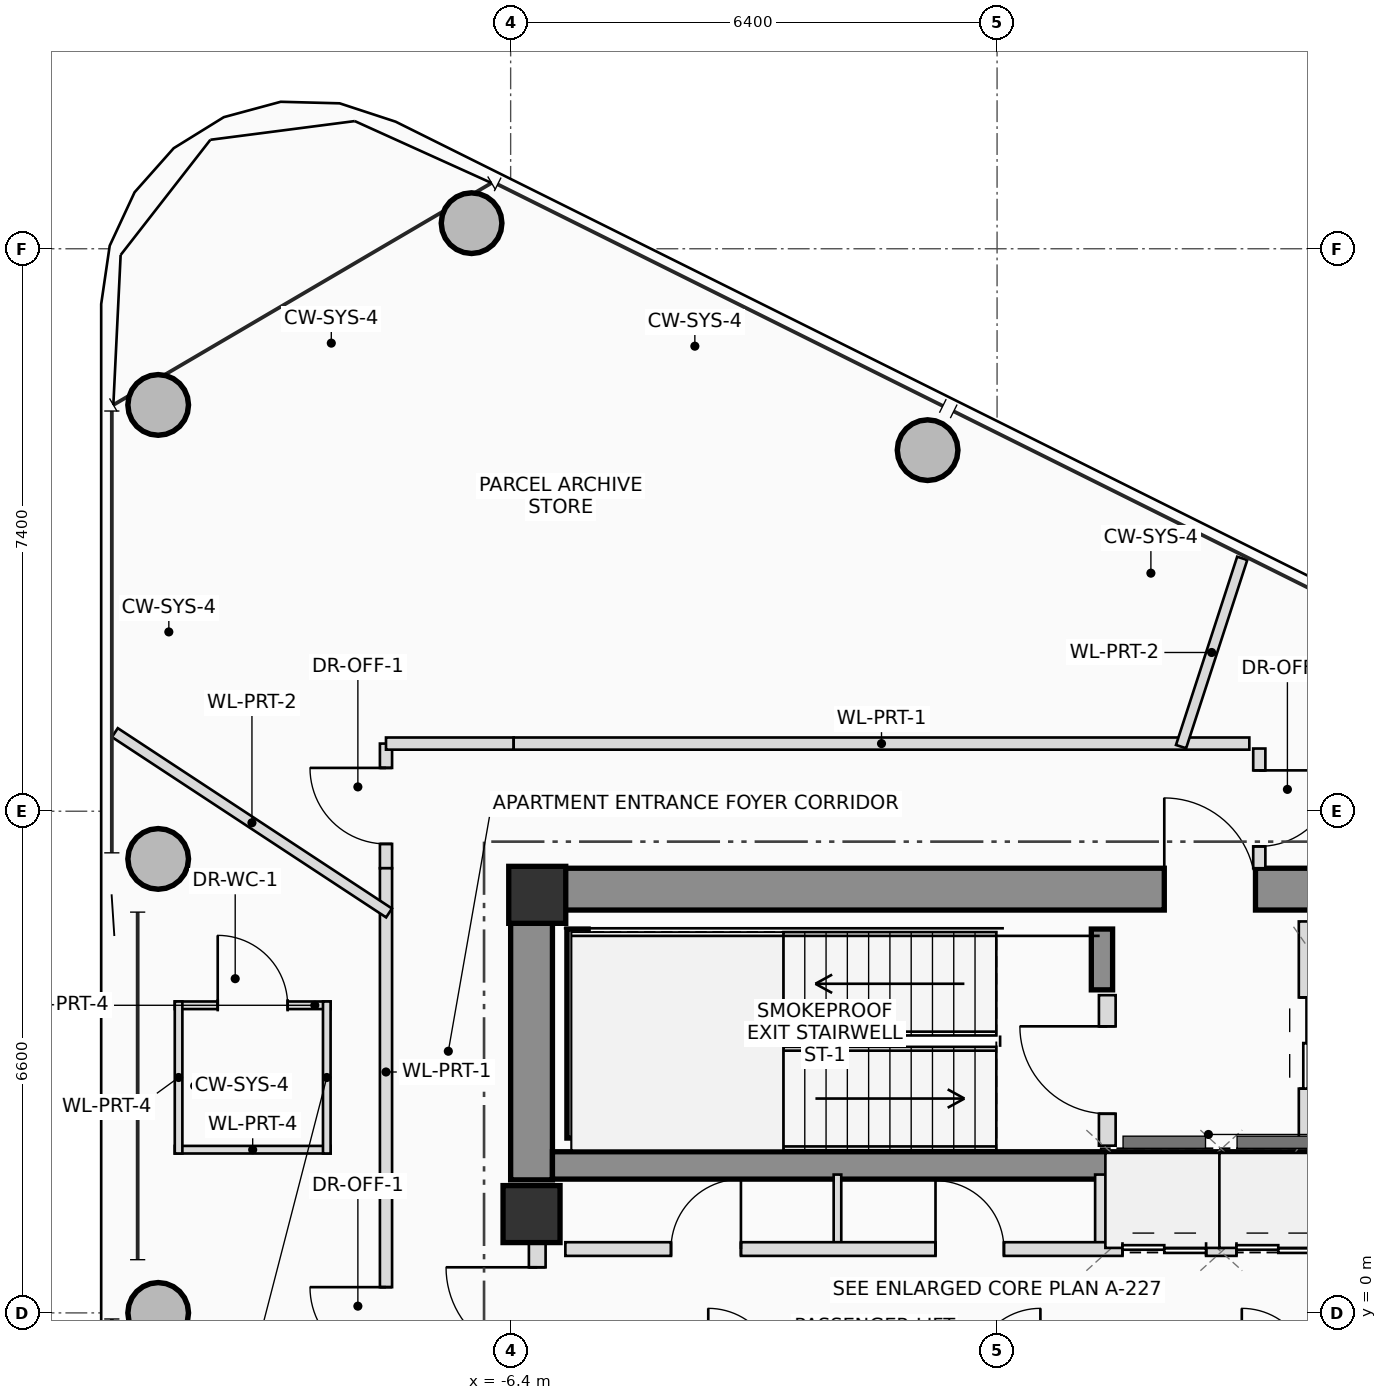
"""IFC4 building model, lengths in metres.
Left out: names, types, materials, properties, quantities, classifications, styles, units other than length and angle.
Written with IfcOpenShell. Run it as: python <this file> out.ifc"""

import sys

from ifc_helpers import new_model, si_unit, direction, frame, frame_2d, origin, origin_2d, place, context, subcontext, project, spatial, rectangle, hollow_circle, extrude, source, transform, mapped, element, fill, save


model = new_model("IFC4")
c1 = context("Model", 3, precision=1e-05, world=origin(), true_north=direction((0.0, 1.0)))
c2 = subcontext(c1, "Body", "Model", "MODEL_VIEW")
j1 = project(units=[si_unit("LENGTHUNIT", "METRE"), si_unit("PLANEANGLEUNIT", "RADIAN")], contexts=[c1])
p1 = place(None, origin())
s1 = spatial("IfcSite", under=j1, at=p1, CompositionType="ELEMENT")
p2 = place(p1, origin())
s2 = spatial("IfcBuilding", under=s1, at=p2, CompositionType="ELEMENT")
p3 = place(p2, frame((0.0, 0.0, 296.75)))
s3 = spatial("IfcBuildingStorey", under=s2, at=p3, CompositionType="ELEMENT", Elevation=296.75)
m1 = source(origin(), c2, "Body", "SweptSolid", [
    extrude(rectangle(XDim=0.75, YDim=0.75, at=origin_2d()), origin(), (0.0, 0.0, 1.0), 3.45),
])
p4 = place(p3, frame((-6.05, 5.5, 0.0), z_axis=(0.0, 0.0, 1.0), x_axis=(1.0, 0.0, 0.0)))
e1 = element("IfcColumn", 1, at=p4, inside=s3, PredefinedType="COLUMN", context=c2, shape_type="MappedRepresentation", body=[
    mapped(m1, transform((0.0, 0.0, 0.0), scale=1.0)),
])
p5 = place(p3, frame((-6.4, 5.575, 0.0), z_axis=(0.0, 0.0, 1.0), x_axis=(1.0, 0.0, 0.0)))
e2 = element("IfcWall", 2, at=p5, inside=s3, PredefinedType="SHEAR", context=c2, shape_type="SweptSolid", body=[
    extrude(rectangle(XDim=12.8, YDim=0.55, at=frame_2d((6.4, 0.0))), origin(), (0.0, 0.0, 1.0), 3.45),
])
p6 = place(p5, frame((8.6, 0.0, 0.0)))
e3 = element("IfcOpeningElement", 3, at=p6, cuts=e2, PredefinedType="OPENING", context=c2, shape_type="SweptSolid", body=[
    extrude(rectangle(XDim=1.2, YDim=2.2, at=frame_2d((0.6, 1.1))), frame((0.0, 0.285, 0.0), z_axis=(0.0, -1.0, 0.0), x_axis=(1.0, 0.0, 0.0)), (0.0, 0.0, 1.0), 0.57),
])
p7 = place(p3, frame((-6.125, 1.75, 0.0), z_axis=(0.0, 0.0, 1.0), x_axis=(0.0, 1.0, 0.0)))
e4 = element("IfcWall", 4, at=p7, inside=s3, PredefinedType="SHEAR", context=c2, shape_type="SweptSolid", body=[
    extrude(rectangle(XDim=3.55, YDim=0.55, at=frame_2d((1.775, 0.0))), origin(), (0.0, 0.0, 1.0), 3.45),
])
p8 = place(p3, frame((-5.85, 1.94, 0.0), z_axis=(0.0, 0.0, 1.0), x_axis=(1.0, 0.0, 0.0)))
e5 = element("IfcWall", 5, at=p8, inside=s3, PredefinedType="SHEAR", context=c2, shape_type="SweptSolid", body=[
    extrude(rectangle(XDim=11.7, YDim=0.36, at=frame_2d((5.85, 0.0))), origin(), (0.0, 0.0, 1.0), 3.45),
])
p9 = place(p3, frame((-5.52, 2.3, 0.0), z_axis=(0.0, 0.0, 1.0), x_axis=(0.0, 1.0, 0.0)))
e6 = element("IfcWall", 6, at=p9, inside=s3, PredefinedType="SHEAR", context=c2, shape_type="SweptSolid", body=[
    extrude(rectangle(XDim=2.75, YDim=0.28, at=frame_2d((1.375, 0.0))), origin(), (0.0, 0.0, 1.0), 3.45),
])
p10 = place(p3, frame((1.38, 4.25, 0.0), z_axis=(0.0, 0.0, 1.0), x_axis=(0.0, 1.0, 0.0)))
e7 = element("IfcWall", 7, at=p10, inside=s3, PredefinedType="SHEAR", context=c2, shape_type="SweptSolid", body=[
    extrude(rectangle(XDim=0.8, YDim=0.28, at=frame_2d((0.4, 0.0))), origin(), (0.0, 0.0, 1.0), 3.45),
])
p11 = place(p3, frame((-6.125, 1.3, 0.0), z_axis=(0.0, 0.0, 1.0), x_axis=(1.0, 0.0, 0.0)))
e8 = element("IfcColumn", 8, at=p11, inside=s3, PredefinedType="COLUMN", context=c2, shape_type="MappedRepresentation", body=[
    mapped(m1, transform((0.0, 0.0, 0.0), scale=1.0)),
])
m2 = source(origin(), c2, "Body", "SweptSolid", [
    extrude(hollow_circle(Radius=0.4, WallThickness=0.028, at=origin_2d()), origin(), (0.0, 0.0, 1.0), 3.45),
])
for number, where, z_axis, x_axis in (
    (9, (-0.914, 11.35, 0.0), (0.0, 0.0, 1.0), (1.0, 0.0, 0.0)),
    (10, (-6.914, 14.337, 0.0), (0.0, 0.0, 1.0), (1.0, 0.0, 0.0)),
    (11, (-11.037, 11.945, 0.0), (0.0, 0.0, 1.0), (1.0, 0.0, 0.0)),
    (12, (-11.037, 5.973, 0.0), (0.0, 0.0, 1.0), (1.0, 0.0, 0.0)),
    (13, (-11.037, 0.0, 0.0), (0.0, 0.0, 1.0), (1.0, 0.0, 0.0)),
):
    element("IfcColumn", number, at=place(p3, frame(where, z_axis=z_axis, x_axis=x_axis)), inside=s3, PredefinedType="COLUMN", context=c2, shape_type="MappedRepresentation", body=[
        mapped(m2, transform((0.0, 0.0, 0.0), scale=1.0)),
    ])
p12 = place(p3, frame((-6.05, -0.95, 0.0), z_axis=(0.0, 0.0, 1.0), x_axis=(0.0, 1.0, 0.0)))
e14 = element("IfcWall", 14, at=p12, inside=s3, PredefinedType="PLUMBINGWALL", context=c2, shape_type="SweptSolid", body=[
    extrude(rectangle(XDim=1.9, YDim=0.22, at=frame_2d((0.95, 0.0))), origin(), (0.0, 0.0, 1.0), 2.23),
])
p13 = place(p12, frame((0.35, 0.0, 0.0)))
e15 = element("IfcOpeningElement", 15, at=p13, cuts=e14, PredefinedType="OPENING", context=c2, shape_type="SweptSolid", body=[
    extrude(rectangle(XDim=1.2, YDim=2.2, at=frame_2d((0.6, 1.1))), frame((0.0, 0.12, 0.0), z_axis=(0.0, -1.0, 0.0), x_axis=(1.0, 0.0, 0.0)), (0.0, 0.0, 1.0), 0.24),
])
p14 = place(p3, frame((1.45, 2.2, 0.0), z_axis=(0.0, 0.0, 1.0), x_axis=(0.0, 1.0, 0.0)))
e16 = element("IfcWall", 16, at=p14, inside=s3, PredefinedType="PLUMBINGWALL", context=c2, shape_type="SweptSolid", body=[
    extrude(rectangle(XDim=1.98, YDim=0.22, at=frame_2d((0.99, 0.0))), origin(), (0.0, 0.0, 1.0), 3.25),
])
p15 = place(p14, frame((0.42, 0.0, 0.0)))
e17 = element("IfcOpeningElement", 17, at=p15, cuts=e16, PredefinedType="OPENING", context=c2, shape_type="SweptSolid", body=[
    extrude(rectangle(XDim=1.15, YDim=2.15, at=frame_2d((0.575, 1.075))), frame((0.0, 0.12, 0.0), z_axis=(0.0, -1.0, 0.0), x_axis=(1.0, 0.0, 0.0)), (0.0, 0.0, 1.0), 0.24),
])
p16 = place(p3, frame((4.08, 2.2, 0.0), z_axis=(0.0, 0.0, 1.0), x_axis=(0.0, 1.0, 0.0)))
e18 = element("IfcWall", 18, at=p16, inside=s3, PredefinedType="PLUMBINGWALL", context=c2, shape_type="SweptSolid", body=[
    extrude(rectangle(XDim=2.95, YDim=0.22, at=frame_2d((1.475, 0.0))), origin(), (0.0, 0.0, 1.0), 3.25),
])
p17 = place(p16, frame((0.75, 0.0, 0.0)))
e19 = element("IfcOpeningElement", 19, at=p17, cuts=e18, PredefinedType="OPENING", context=c2, shape_type="SweptSolid", body=[
    extrude(rectangle(XDim=1.2, YDim=2.25, at=frame_2d((0.6, 1.125))), frame((0.0, 0.12, 0.0), z_axis=(0.0, -1.0, 0.0), x_axis=(1.0, 0.0, 0.0)), (0.0, 0.0, 1.0), 0.24),
])
p18 = place(p3, frame((-2.1, 0.84, 0.0), z_axis=(0.0, 0.0, 1.0), x_axis=(0.0, 1.0, 0.0)))
e20 = element("IfcWall", 20, at=p18, inside=s3, PredefinedType="PARTITIONING", context=c2, shape_type="SweptSolid", body=[
    extrude(rectangle(XDim=0.98, YDim=0.1, at=frame_2d((0.49, 0.0))), origin(), (0.0, 0.0, 1.0), 3.25),
])
for number, where, z_axis, x_axis in (
    (21, (1.38, 0.84, 0.0), (0.0, 0.0, 1.0), (0.0, 1.0, 0.0)),
    (22, (3.02, 0.84, 0.0), (0.0, 0.0, 1.0), (0.0, 1.0, 0.0)),
):
    element("IfcWall", number, at=place(p3, frame(where, z_axis=z_axis, x_axis=x_axis)), inside=s3, PredefinedType="PLUMBINGWALL", context=c2, shape_type="SweptSolid", body=[
        extrude(rectangle(XDim=0.98, YDim=0.18, at=frame_2d((0.49, 0.0))), origin(), (0.0, 0.0, 1.0), 3.25),
    ])
p19 = place(p3, frame((-5.68, 0.84, 0.0), z_axis=(0.0, 0.0, 1.0), x_axis=(1.0, 0.0, 0.0)))
e23 = element("IfcWall", 23, at=p19, inside=s3, PredefinedType="PLUMBINGWALL", context=c2, shape_type="SweptSolid", body=[
    extrude(rectangle(XDim=11.33, YDim=0.18, at=frame_2d((5.665, 0.0))), origin(), (0.0, 0.0, 1.0), 3.25),
])
p20 = place(p19, frame((1.39, 0.0, 0.0)))
e24 = element("IfcOpeningElement", 24, at=p20, cuts=e23, PredefinedType="OPENING", context=c2, shape_type="SweptSolid", body=[
    extrude(rectangle(XDim=0.92, YDim=2.1, at=frame_2d((0.46, 1.05))), frame((0.0, 0.1, 0.0), z_axis=(0.0, -1.0, 0.0), x_axis=(1.0, 0.0, 0.0)), (0.0, 0.0, 1.0), 0.2),
])
p21 = place(p19, frame((4.87, 0.0, 0.0)))
e25 = element("IfcOpeningElement", 25, at=p21, cuts=e23, PredefinedType="OPENING", context=c2, shape_type="SweptSolid", body=[
    extrude(rectangle(XDim=0.9, YDim=2.05, at=frame_2d((0.45, 1.025))), frame((0.0, 0.1, 0.0), z_axis=(0.0, -1.0, 0.0), x_axis=(1.0, 0.0, 0.0)), (0.0, 0.0, 1.0), 0.2),
])
p22 = place(p19, frame((7.33, 0.0, 0.0)))
e26 = element("IfcOpeningElement", 26, at=p22, cuts=e23, PredefinedType="OPENING", context=c2, shape_type="SweptSolid", body=[
    extrude(rectangle(XDim=1.1, YDim=2.2, at=frame_2d((0.55, 1.1))), frame((0.0, 0.1, 0.0), z_axis=(0.0, -1.0, 0.0), x_axis=(1.0, 0.0, 0.0)), (0.0, 0.0, 1.0), 0.2),
])
p23 = place(p19, frame((8.83, 0.0, 0.0)))
e27 = element("IfcOpeningElement", 27, at=p23, cuts=e23, PredefinedType="OPENING", context=c2, shape_type="SweptSolid", body=[
    extrude(rectangle(XDim=1.1, YDim=2.2, at=frame_2d((0.55, 1.1))), frame((0.0, 0.1, 0.0), z_axis=(0.0, -1.0, 0.0), x_axis=(1.0, 0.0, 0.0)), (0.0, 0.0, 1.0), 0.2),
])
p24 = place(p19, frame((10.25, 0.0, 0.0)))
e28 = element("IfcOpeningElement", 28, at=p24, cuts=e23, PredefinedType="OPENING", context=c2, shape_type="SweptSolid", body=[
    extrude(rectangle(XDim=0.9, YDim=2.05, at=frame_2d((0.45, 1.025))), frame((0.0, 0.1, 0.0), z_axis=(0.0, -1.0, 0.0), x_axis=(1.0, 0.0, 0.0)), (0.0, 0.0, 1.0), 0.2),
])
p25 = place(p3, frame((-10.819, 4.047, 0.0), z_axis=(0.0, 0.0, 1.0), x_axis=(1.0, 0.0, 0.0)))
e29 = element("IfcWall", 29, at=p25, inside=s3, PredefinedType="PARTITIONING", context=c2, shape_type="SweptSolid", body=[
    extrude(rectangle(XDim=2.05, YDim=0.1, at=frame_2d((1.025, 0.0))), origin(), (0.0, 0.0, 1.0), 2.905),
])
p26 = place(p25, frame((0.565, 0.0, 0.0)))
e30 = element("IfcOpeningElement", 30, at=p26, cuts=e29, PredefinedType="OPENING", context=c2, shape_type="SweptSolid", body=[
    extrude(rectangle(XDim=0.92, YDim=2.1, at=frame_2d((0.46, 1.05))), frame((0.0, 0.06, 0.0), z_axis=(0.0, -1.0, 0.0), x_axis=(1.0, 0.0, 0.0)), (0.0, 0.0, 1.0), 0.12),
])
p27 = place(p3, frame((-8.769, 2.147, 0.0), z_axis=(0.0, 0.0, 1.0), x_axis=(-1.0, 0.0, 0.0)))
e31 = element("IfcWall", 31, at=p27, inside=s3, PredefinedType="PARTITIONING", context=c2, shape_type="SweptSolid", body=[
    extrude(rectangle(XDim=2.05, YDim=0.1, at=frame_2d((1.025, 0.0))), origin(), (0.0, 0.0, 1.0), 2.905),
])
for number, where, z_axis, x_axis in (
    (32, (-8.819, 4.097, 0.0), (0.0, 0.0, 1.0), (0.0, -1.0, 0.0)),
    (33, (-10.769, 2.097, 0.0), (0.0, 0.0, 1.0), (0.0, 1.0, 0.0)),
):
    element("IfcWall", number, at=place(p3, frame(where, z_axis=z_axis, x_axis=x_axis)), inside=s3, PredefinedType="PARTITIONING", context=c2, shape_type="SweptSolid", body=[
        extrude(rectangle(XDim=2.0, YDim=0.1, at=frame_2d((1.0, 0.0))), origin(), (0.0, 0.0, 1.0), 3.25),
    ])
p28 = place(p3, frame((-8.04, 5.85, 0.0), z_axis=(0.0, 0.0, 1.0), x_axis=(0.0, 1.0, 0.0)))
e34 = element("IfcWall", 34, at=p28, inside=s3, PredefinedType="PARTITIONING", context=c2, shape_type="SweptSolid", body=[
    extrude(rectangle(XDim=1.64, YDim=0.16, at=frame_2d((0.82, 0.0))), origin(), (0.0, 0.0, 1.0), 2.905),
])
p29 = place(p28, frame((0.32, 0.0, 0.0)))
e35 = element("IfcOpeningElement", 35, at=p29, cuts=e34, PredefinedType="OPENING", context=c2, shape_type="SweptSolid", body=[
    extrude(rectangle(XDim=1.0, YDim=2.25, at=frame_2d((0.5, 1.125))), frame((0.0, 0.09, 0.0), z_axis=(0.0, -1.0, 0.0), x_axis=(1.0, 0.0, 0.0)), (0.0, 0.0, 1.0), 0.18),
])
p30 = place(p3, frame((-8.04, 7.49, 0.0), z_axis=(0.0, 0.0, 1.0), x_axis=(1.0, 0.0, 0.0)))
e36 = element("IfcWall", 36, at=p30, inside=s3, PredefinedType="PARTITIONING", context=c2, shape_type="SweptSolid", body=[
    extrude(rectangle(XDim=1.68, YDim=0.16, at=frame_2d((0.84, 0.0))), origin(), (0.0, 0.0, 1.0), 2.655),
])
p31 = place(p3, frame((-6.36, 7.49, 0.0), z_axis=(0.0, 0.0, 1.0), x_axis=(1.0, 0.0, 0.0)))
e37 = element("IfcWall", 37, at=p31, inside=s3, PredefinedType="PARTITIONING", context=c2, shape_type="SweptSolid", body=[
    extrude(rectangle(XDim=9.679, YDim=0.16, at=frame_2d((4.84, 0.0))), origin(), (0.0, 0.0, 1.0), 2.655),
])
p32 = place(p3, frame((3.45, 7.425, 0.0), z_axis=(0.0, 0.0, 1.0), x_axis=(0.0, -1.0, 0.0)))
e38 = element("IfcWall", 38, at=p32, inside=s3, PredefinedType="PARTITIONING", context=c2, shape_type="SweptSolid", body=[
    extrude(rectangle(XDim=1.575, YDim=0.16, at=frame_2d((0.787, 0.0))), origin(), (0.0, 0.0, 1.0), 2.855),
])
p33 = place(p32, frame((0.287, 0.0, 0.0)))
e39 = element("IfcOpeningElement", 39, at=p33, cuts=e38, PredefinedType="OPENING", context=c2, shape_type="SweptSolid", body=[
    extrude(rectangle(XDim=1.0, YDim=2.25, at=frame_2d((0.5, 1.125))), frame((0.0, 0.09, 0.0), z_axis=(0.0, -1.0, 0.0), x_axis=(1.0, 0.0, 0.0)), (0.0, 0.0, 1.0), 0.18),
])
p34 = place(p3, frame((-8.04, -5.85, 0.0), z_axis=(0.0, 0.0, 1.0), x_axis=(0.0, 1.0, 0.0)))
e40 = element("IfcWall", 40, at=p34, inside=s3, PredefinedType="PARTITIONING", context=c2, shape_type="SweptSolid", body=[
    extrude(rectangle(XDim=11.7, YDim=0.16, at=frame_2d((5.85, 0.0))), origin(), (0.0, 0.0, 1.0), 2.655),
])
p35 = place(p34, frame((5.189, 0.0, 0.0)))
e41 = element("IfcOpeningElement", 41, at=p35, cuts=e40, PredefinedType="OPENING", context=c2, shape_type="SweptSolid", body=[
    extrude(rectangle(XDim=1.0, YDim=2.25, at=frame_2d((0.5, 1.125))), frame((0.0, 0.09, 0.0), z_axis=(0.0, -1.0, 0.0), x_axis=(1.0, 0.0, 0.0)), (0.0, 0.0, 1.0), 0.18),
])
p36 = place(p3, frame((2.421, 7.45, 0.0), z_axis=(0.0, 0.0, 1.0), x_axis=(0.309047920595, 0.951046467201, 0.0)))
e42 = element("IfcWall", 42, at=p36, inside=s3, PredefinedType="PARTITIONING", context=c2, shape_type="SweptSolid", body=[
    extrude(rectangle(XDim=2.604, YDim=0.14, at=frame_2d((1.302, 0.0))), origin(), (0.0, 0.0, 1.0), 2.815),
])
p37 = place(p3, frame((-8.0, 5.262, 0.0), z_axis=(0.0, 0.0, 1.0), x_axis=(-0.835496328285, 0.549496028578, 0.0)))
e43 = element("IfcWall", 43, at=p37, inside=s3, PredefinedType="PARTITIONING", context=c2, shape_type="SweptSolid", body=[
    extrude(rectangle(XDim=4.318, YDim=0.14, at=frame_2d((2.159, 0.0))), origin(), (0.0, 0.0, 1.0), 2.655),
])
p38 = place(p6, origin())
e44 = element("IfcDoor", 44, at=p38, inside=s3, OperationType="SINGLE_SWING_LEFT", PredefinedType="DOOR", context=c2, shape_type="SweptSolid", body=[
    extrude(rectangle(XDim=1.2, YDim=2.2, at=frame_2d((0.6, 1.1))), frame((0.0, 0.025, 0.0), z_axis=(0.0, -1.0, 0.0), x_axis=(1.0, 0.0, 0.0)), (0.0, 0.0, 1.0), 0.05),
])
fill(e3, e44)
p39 = place(p13, origin())
e45 = element("IfcDoor", 45, at=p39, inside=s3, OperationType="SINGLE_SWING_RIGHT", PredefinedType="DOOR", context=c2, shape_type="SweptSolid", body=[
    extrude(rectangle(XDim=1.2, YDim=2.2, at=frame_2d((0.6, 1.1))), frame((0.0, 0.025, 0.0), z_axis=(0.0, -1.0, 0.0), x_axis=(1.0, 0.0, 0.0)), (0.0, 0.0, 1.0), 0.05),
])
fill(e15, e45)
p40 = place(p15, origin())
e46 = element("IfcDoor", 46, at=p40, inside=s3, OperationType="SINGLE_SWING_RIGHT", PredefinedType="DOOR", context=c2, shape_type="SweptSolid", body=[
    extrude(rectangle(XDim=1.15, YDim=2.15, at=frame_2d((0.575, 1.075))), frame((0.0, 0.025, 0.0), z_axis=(0.0, -1.0, 0.0), x_axis=(1.0, 0.0, 0.0)), (0.0, 0.0, 1.0), 0.05),
])
fill(e17, e46)
p41 = place(p17, origin())
e47 = element("IfcDoor", 47, at=p41, inside=s3, OperationType="DOUBLE_DOOR_SLIDING", PredefinedType="DOOR", context=c2, shape_type="SweptSolid", body=[
    extrude(rectangle(XDim=1.2, YDim=2.25, at=frame_2d((0.6, 1.125))), frame((0.0, 0.025, 0.0), z_axis=(0.0, -1.0, 0.0), x_axis=(1.0, 0.0, 0.0)), (0.0, 0.0, 1.0), 0.05),
])
fill(e19, e47)
p42 = place(p20, origin())
e48 = element("IfcDoor", 48, at=p42, inside=s3, OperationType="SINGLE_SWING_RIGHT", PredefinedType="DOOR", context=c2, shape_type="SweptSolid", body=[
    extrude(rectangle(XDim=0.92, YDim=2.1, at=frame_2d((0.46, 1.05))), frame((0.0, 0.025, 0.0), z_axis=(0.0, -1.0, 0.0), x_axis=(1.0, 0.0, 0.0)), (0.0, 0.0, 1.0), 0.05),
])
fill(e24, e48)
p43 = place(p21, origin())
e49 = element("IfcDoor", 49, at=p43, inside=s3, OperationType="SINGLE_SWING_LEFT", PredefinedType="DOOR", context=c2, shape_type="SweptSolid", body=[
    extrude(rectangle(XDim=0.9, YDim=2.05, at=frame_2d((0.45, 1.025))), frame((0.0, 0.025, 0.0), z_axis=(0.0, -1.0, 0.0), x_axis=(1.0, 0.0, 0.0)), (0.0, 0.0, 1.0), 0.05),
])
fill(e25, e49)
p44 = place(p22, origin())
e50 = element("IfcDoor", 50, at=p44, inside=s3, OperationType="DOUBLE_DOOR_SLIDING", PredefinedType="DOOR", context=c2, shape_type="SweptSolid", body=[
    extrude(rectangle(XDim=1.1, YDim=2.2, at=frame_2d((0.55, 1.1))), frame((0.0, 0.025, 0.0), z_axis=(0.0, -1.0, 0.0), x_axis=(1.0, 0.0, 0.0)), (0.0, 0.0, 1.0), 0.05),
])
fill(e26, e50)
p45 = place(p23, origin())
e51 = element("IfcDoor", 51, at=p45, inside=s3, OperationType="DOUBLE_DOOR_SLIDING", PredefinedType="DOOR", context=c2, shape_type="SweptSolid", body=[
    extrude(rectangle(XDim=1.1, YDim=2.2, at=frame_2d((0.55, 1.1))), frame((0.0, 0.025, 0.0), z_axis=(0.0, -1.0, 0.0), x_axis=(1.0, 0.0, 0.0)), (0.0, 0.0, 1.0), 0.05),
])
fill(e27, e51)
p46 = place(p26, origin())
e52 = element("IfcDoor", 52, at=p46, inside=s3, OperationType="SINGLE_SWING_LEFT", PredefinedType="DOOR", context=c2, shape_type="SweptSolid", body=[
    extrude(rectangle(XDim=0.92, YDim=2.1, at=frame_2d((0.46, 1.05))), frame((0.0, 0.025, 0.0), z_axis=(0.0, -1.0, 0.0), x_axis=(1.0, 0.0, 0.0)), (0.0, 0.0, 1.0), 0.05),
])
fill(e30, e52)
p47 = place(p29, origin())
e53 = element("IfcDoor", 53, at=p47, inside=s3, OperationType="SINGLE_SWING_RIGHT", PredefinedType="DOOR", context=c2, shape_type="SweptSolid", body=[
    extrude(rectangle(XDim=1.0, YDim=2.25, at=frame_2d((0.5, 1.125))), frame((0.0, 0.025, 0.0), z_axis=(0.0, -1.0, 0.0), x_axis=(1.0, 0.0, 0.0)), (0.0, 0.0, 1.0), 0.05),
])
fill(e35, e53)
p48 = place(p33, origin())
e54 = element("IfcDoor", 54, at=p48, inside=s3, OperationType="SINGLE_SWING_LEFT", PredefinedType="DOOR", context=c2, shape_type="SweptSolid", body=[
    extrude(rectangle(XDim=1.0, YDim=2.25, at=frame_2d((0.5, 1.125))), frame((0.0, 0.025, 0.0), z_axis=(0.0, -1.0, 0.0), x_axis=(1.0, 0.0, 0.0)), (0.0, 0.0, 1.0), 0.05),
])
fill(e39, e54)
p49 = place(p35, origin())
e55 = element("IfcDoor", 55, at=p49, inside=s3, OperationType="SINGLE_SWING_RIGHT", PredefinedType="DOOR", context=c2, shape_type="SweptSolid", body=[
    extrude(rectangle(XDim=1.0, YDim=2.25, at=frame_2d((0.5, 1.125))), frame((0.0, 0.025, 0.0), z_axis=(0.0, -1.0, 0.0), x_axis=(1.0, 0.0, 0.0)), (0.0, 0.0, 1.0), 0.05),
])
fill(e41, e55)
save(model, sys.argv[1])
